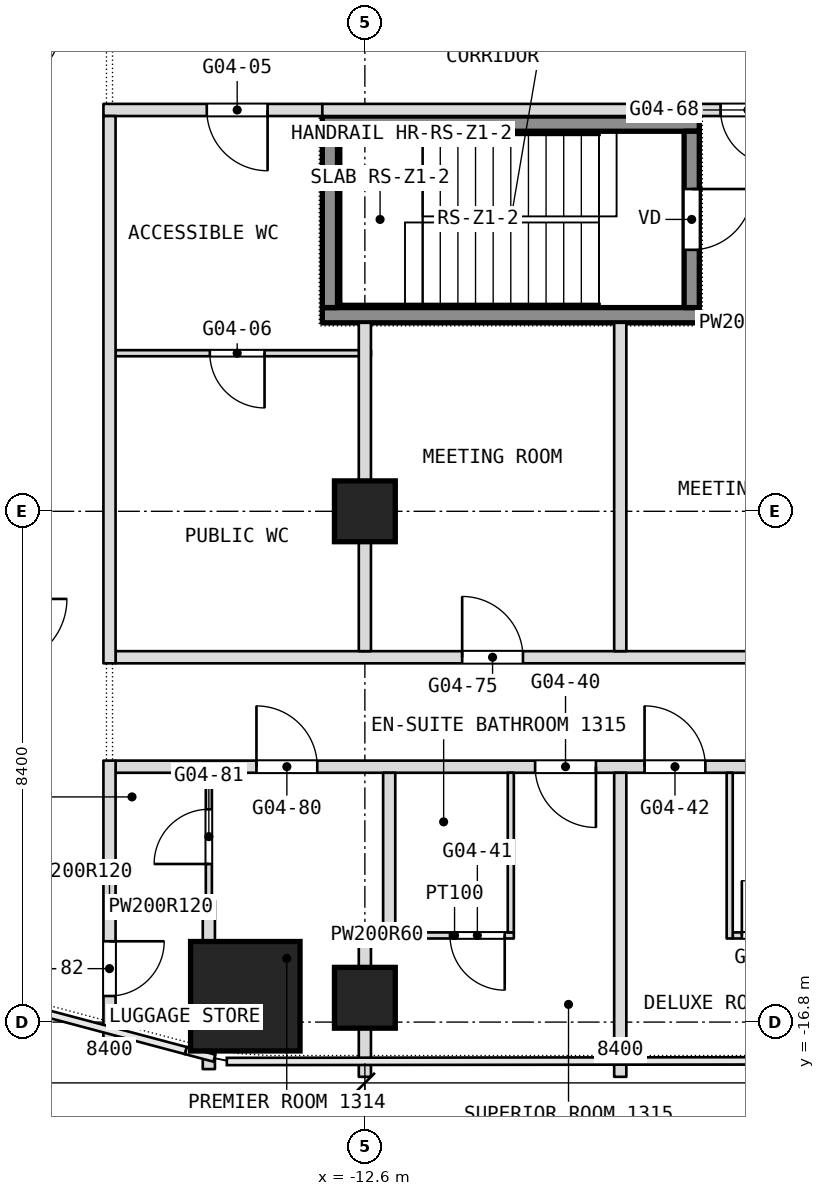
"""IFC4 building model, lengths in metres.
Left out: names, types, materials, properties, quantities, classifications, styles, units other than length and angle.
Written with IfcOpenShell. Run it as: python <this file> out.ifc"""

import sys

from ifc_helpers import new_model, si_unit, direction, frame, frame_2d, origin, origin_2d, place, context, subcontext, project, spatial, rectangle, extrude, element, fill, save


model = new_model("IFC4")
c1 = context("Model", 3, precision=1e-05, world=origin(), true_north=direction((0.0, 1.0)))
c2 = subcontext(c1, "Body", "Model", "MODEL_VIEW")
j1 = project(units=[si_unit("LENGTHUNIT", "METRE"), si_unit("PLANEANGLEUNIT", "RADIAN")], contexts=[c1])
p1 = place(None, origin())
s1 = spatial("IfcSite", under=j1, at=p1, CompositionType="ELEMENT")
p2 = place(p1, origin())
s2 = spatial("IfcBuilding", under=s1, at=p2, CompositionType="ELEMENT")
p3 = place(p2, frame((0.0, 0.0, 61.7)))
s3 = spatial("IfcBuildingStorey", under=s2, at=p3, CompositionType="ELEMENT", Elevation=61.7)
p4 = place(p3, frame((-14.566, -16.375, 0.0), z_axis=(0.0, 0.0, 1.0), x_axis=(1.0, 0.0, 0.0)))
e1 = element("IfcColumn", 1, at=p4, inside=s3, PredefinedType="COLUMN", context=c2, shape_type="SweptSolid", body=[
    extrude(rectangle(XDim=1.8, YDim=1.8, at=origin_2d()), origin(), (0.0, 0.0, 1.0), 3.6),
])
for number, where, z_axis, x_axis in (
    (2, (-12.6, -8.4, 0.0), (0.0, 0.0, 1.0), (1.0, 0.0, 0.0)),
    (3, (-12.6, -16.4, 0.0), (0.0, 0.0, 1.0), (1.0, 0.0, 0.0)),
):
    element("IfcColumn", number, at=place(p3, frame(where, z_axis=z_axis, x_axis=x_axis)), inside=s3, PredefinedType="COLUMN", context=c2, shape_type="SweptSolid", body=[
        extrude(rectangle(XDim=1.0, YDim=1.0, at=origin_2d()), origin(), (0.0, 0.0, 1.0), 3.6),
    ])
p5 = place(p3, frame((-12.7, -15.375, 0.0), z_axis=(0.0, 0.0, 1.0), x_axis=(1.0, 0.0, 0.0)))
e4 = element("IfcWall", 4, at=p5, inside=s3, PredefinedType="PARTITIONING", context=c2, shape_type="SweptSolid", body=[
    extrude(rectangle(XDim=0.6, YDim=0.2, at=frame_2d((0.3, 0.0))), origin(), (0.0, 0.0, 1.0), 3.34),
])
p6 = place(p3, frame((-12.1, -15.375, 0.0), z_axis=(0.0, 0.0, 1.0), x_axis=(1.0, 0.0, 0.0)))
e5 = element("IfcWall", 5, at=p6, inside=s3, PredefinedType="PARTITIONING", context=c2, shape_type="SweptSolid", body=[
    extrude(rectangle(XDim=1.95, YDim=0.1, at=frame_2d((0.975, 0.0))), origin(), (0.0, 0.0, 1.0), 3.34),
])
p7 = place(p6, frame((0.9, 0.0, 0.0)))
e6 = element("IfcOpeningElement", 6, at=p7, cuts=e5, PredefinedType="OPENING", context=c2, shape_type="SweptSolid", body=[
    extrude(rectangle(XDim=0.9, YDim=2.1, at=frame_2d((0.45, 1.05))), frame((0.0, 0.05, 0.0), z_axis=(0.0, -1.0, 0.0), x_axis=(1.0, 0.0, 0.0)), (0.0, 0.0, 1.0), 0.1),
])
p8 = place(p3, frame((-6.55, -15.375, 0.0), z_axis=(0.0, 0.0, 1.0), x_axis=(1.0, 0.0, 0.0)))
e7 = element("IfcWall", 7, at=p8, inside=s3, PredefinedType="PARTITIONING", context=c2, shape_type="SweptSolid", body=[
    extrude(rectangle(XDim=2.45, YDim=0.1, at=frame_2d((1.225, 0.0))), origin(), (0.0, 0.0, 1.0), 3.34),
])
p9 = place(p8, frame((0.15, 0.0, 0.0)))
e8 = element("IfcOpeningElement", 8, at=p9, cuts=e7, PredefinedType="OPENING", context=c2, shape_type="SweptSolid", body=[
    extrude(rectangle(XDim=0.9, YDim=2.1, at=frame_2d((0.45, 1.05))), frame((0.0, 0.05, 0.0), z_axis=(0.0, -1.0, 0.0), x_axis=(1.0, 0.0, 0.0)), (0.0, 0.0, 1.0), 0.1),
])
p10 = place(p3, frame((-16.7, -14.9, 0.0), z_axis=(0.0, 0.0, 1.0), x_axis=(1.0, 0.0, 0.0)))
e9 = element("IfcWall", 9, at=p10, inside=s3, PredefinedType="PARTITIONING", context=c2, shape_type="SweptSolid", body=[
    extrude(rectangle(XDim=1.484, YDim=0.2, at=frame_2d((0.742, 0.0))), origin(), (0.0, 0.0, 1.0), 3.34),
])
p11 = place(p3, frame((-16.7, -12.6, 0.0), z_axis=(0.0, 0.0, 1.0), x_axis=(1.0, 0.0, 0.0)))
e10 = element("IfcWall", 10, at=p11, inside=s3, PredefinedType="PARTITIONING", context=c2, shape_type="SweptSolid", body=[
    extrude(rectangle(XDim=33.4, YDim=0.2, at=frame_2d((16.7, 0.0))), origin(), (0.0, 0.0, 1.0), 3.34),
])
p12 = place(p11, frame((6.9, 0.0, 0.0)))
e11 = element("IfcOpeningElement", 11, at=p12, cuts=e10, PredefinedType="OPENING", context=c2, shape_type="SweptSolid", body=[
    extrude(rectangle(XDim=1.0, YDim=2.1, at=frame_2d((0.5, 1.05))), frame((0.0, 0.1, 0.0), z_axis=(0.0, -1.0, 0.0), x_axis=(1.0, 0.0, 0.0)), (0.0, 0.0, 1.0), 0.2),
])
p13 = place(p11, frame((8.7, 0.0, 0.0)))
e12 = element("IfcOpeningElement", 12, at=p13, cuts=e10, PredefinedType="OPENING", context=c2, shape_type="SweptSolid", body=[
    extrude(rectangle(XDim=1.0, YDim=2.1, at=frame_2d((0.5, 1.05))), frame((0.0, 0.1, 0.0), z_axis=(0.0, -1.0, 0.0), x_axis=(1.0, 0.0, 0.0)), (0.0, 0.0, 1.0), 0.2),
])
p14 = place(p11, frame((16.1, 0.0, 0.0)))
e13 = element("IfcOpeningElement", 13, at=p14, cuts=e10, PredefinedType="OPENING", context=c2, shape_type="SweptSolid", body=[
    extrude(rectangle(XDim=1.1, YDim=2.1, at=frame_2d((0.55, 1.05))), frame((0.0, 0.1, 0.0), z_axis=(0.0, -1.0, 0.0), x_axis=(1.0, 0.0, 0.0)), (0.0, 0.0, 1.0), 0.2),
])
p15 = place(p11, frame((24.6, 0.0, 0.0)))
e14 = element("IfcOpeningElement", 14, at=p15, cuts=e10, PredefinedType="OPENING", context=c2, shape_type="SweptSolid", body=[
    extrude(rectangle(XDim=1.1, YDim=2.1, at=frame_2d((0.55, 1.05))), frame((0.0, 0.1, 0.0), z_axis=(0.0, -1.0, 0.0), x_axis=(1.0, 0.0, 0.0)), (0.0, 0.0, 1.0), 0.2),
])
p16 = place(p11, frame((2.317, 0.0, 0.0)))
e15 = element("IfcOpeningElement", 15, at=p16, cuts=e10, PredefinedType="OPENING", context=c2, shape_type="SweptSolid", body=[
    extrude(rectangle(XDim=1.0, YDim=2.1, at=frame_2d((0.5, 1.05))), frame((0.0, 0.1, 0.0), z_axis=(0.0, -1.0, 0.0), x_axis=(1.0, 0.0, 0.0)), (0.0, 0.0, 1.0), 0.2),
])
p17 = place(p11, frame((30.033, 0.0, 0.0)))
e16 = element("IfcOpeningElement", 16, at=p17, cuts=e10, PredefinedType="OPENING", context=c2, shape_type="SweptSolid", body=[
    extrude(rectangle(XDim=1.0, YDim=2.1, at=frame_2d((0.5, 1.05))), frame((0.0, 0.1, 0.0), z_axis=(0.0, -1.0, 0.0), x_axis=(1.0, 0.0, 0.0)), (0.0, 0.0, 1.0), 0.2),
])
p18 = place(p3, frame((-16.7, -10.8, 0.0), z_axis=(0.0, 0.0, 1.0), x_axis=(1.0, 0.0, 0.0)))
e17 = element("IfcWall", 17, at=p18, inside=s3, PredefinedType="PARTITIONING", context=c2, shape_type="SweptSolid", body=[
    extrude(rectangle(XDim=33.4, YDim=0.2, at=frame_2d((16.7, 0.0))), origin(), (0.0, 0.0, 1.0), 3.34),
])
p19 = place(p18, frame((5.7, 0.0, 0.0)))
e18 = element("IfcOpeningElement", 18, at=p19, cuts=e17, PredefinedType="OPENING", context=c2, shape_type="SweptSolid", body=[
    extrude(rectangle(XDim=1.0, YDim=2.1, at=frame_2d((0.5, 1.05))), frame((0.0, 0.1, 0.0), z_axis=(0.0, -1.0, 0.0), x_axis=(1.0, 0.0, 0.0)), (0.0, 0.0, 1.0), 0.2),
])
p20 = place(p18, frame((18.3, 0.0, 0.0)))
e19 = element("IfcOpeningElement", 19, at=p20, cuts=e17, PredefinedType="OPENING", context=c2, shape_type="SweptSolid", body=[
    extrude(rectangle(XDim=1.0, YDim=2.1, at=frame_2d((0.5, 1.05))), frame((0.0, 0.1, 0.0), z_axis=(0.0, -1.0, 0.0), x_axis=(1.0, 0.0, 0.0)), (0.0, 0.0, 1.0), 0.2),
])
p21 = place(p3, frame((-16.7, -5.8, 0.0), z_axis=(0.0, 0.0, 1.0), x_axis=(1.0, 0.0, 0.0)))
e20 = element("IfcWall", 20, at=p21, inside=s3, PredefinedType="PARTITIONING", context=c2, shape_type="SweptSolid", body=[
    extrude(rectangle(XDim=4.2, YDim=0.1, at=frame_2d((2.1, 0.0))), origin(), (0.0, 0.0, 1.0), 3.34),
])
p22 = place(p21, frame((1.55, 0.0, 0.0)))
e21 = element("IfcOpeningElement", 21, at=p22, cuts=e20, PredefinedType="OPENING", context=c2, shape_type="SweptSolid", body=[
    extrude(rectangle(XDim=0.9, YDim=2.1, at=frame_2d((0.45, 1.05))), frame((0.0, 0.05, 0.0), z_axis=(0.0, -1.0, 0.0), x_axis=(1.0, 0.0, 0.0)), (0.0, 0.0, 1.0), 0.1),
])
p23 = place(p3, frame((-7.1, -5.3, 0.0), z_axis=(0.0, 0.0, 1.0), x_axis=(1.0, 0.0, 0.0)))
e22 = element("IfcWall", 22, at=p23, inside=s3, PredefinedType="PARTITIONING", context=c2, shape_type="SweptSolid", body=[
    extrude(rectangle(XDim=1.7, YDim=0.2, at=frame_2d((0.85, 0.0))), origin(), (0.0, 0.0, 1.0), 3.34),
])
p24 = place(p3, frame((-16.9, -1.8, 0.0), z_axis=(0.0, 0.0, 1.0), x_axis=(1.0, 0.0, 0.0)))
e23 = element("IfcWall", 23, at=p24, inside=s3, PredefinedType="PARTITIONING", context=c2, shape_type="SweptSolid", body=[
    extrude(rectangle(XDim=3.6, YDim=0.2, at=frame_2d((1.8, 0.0))), origin(), (0.0, 0.0, 1.0), 3.34),
])
p25 = place(p24, frame((1.7, 0.0, 0.0)))
e24 = element("IfcOpeningElement", 24, at=p25, cuts=e23, PredefinedType="OPENING", context=c2, shape_type="SweptSolid", body=[
    extrude(rectangle(XDim=1.0, YDim=2.1, at=frame_2d((0.5, 1.05))), frame((0.0, 0.1, 0.0), z_axis=(0.0, -1.0, 0.0), x_axis=(1.0, 0.0, 0.0)), (0.0, 0.0, 1.0), 0.2),
])
p26 = place(p3, frame((-13.3, -1.8, 0.0), z_axis=(0.0, 0.0, 1.0), x_axis=(1.0, 0.0, 0.0)))
e25 = element("IfcWall", 25, at=p26, inside=s3, PredefinedType="PARTITIONING", context=c2, shape_type="SweptSolid", body=[
    extrude(rectangle(XDim=7.9, YDim=0.2, at=frame_2d((3.95, 0.0))), origin(), (0.0, 0.0, 1.0), 3.34),
])
p27 = place(p26, frame((6.55, 0.0, 0.0)))
e26 = element("IfcOpeningElement", 26, at=p27, cuts=e25, PredefinedType="OPENING", context=c2, shape_type="SweptSolid", body=[
    extrude(rectangle(XDim=0.9, YDim=2.1, at=frame_2d((0.45, 1.05))), frame((0.0, 0.1, 0.0), z_axis=(0.0, -1.0, 0.0), x_axis=(1.0, 0.0, 0.0)), (0.0, 0.0, 1.0), 0.2),
])
p28 = place(p3, frame((-6.6, -15.425, 0.0), z_axis=(0.0, 0.0, 1.0), x_axis=(0.0, 1.0, 0.0)))
e27 = element("IfcWall", 27, at=p28, inside=s3, PredefinedType="PARTITIONING", context=c2, shape_type="SweptSolid", body=[
    extrude(rectangle(XDim=2.725, YDim=0.1, at=frame_2d((1.363, 0.0))), origin(), (0.0, 0.0, 1.0), 3.34),
])
p29 = place(p3, frame((-8.4, -17.7, 0.0), z_axis=(0.0, 0.0, 1.0), x_axis=(0.0, 1.0, 0.0)))
e28 = element("IfcWall", 28, at=p29, inside=s3, PredefinedType="PARTITIONING", context=c2, shape_type="SweptSolid", body=[
    extrude(rectangle(XDim=5.0, YDim=0.2, at=frame_2d((2.5, 0.0))), origin(), (0.0, 0.0, 1.0), 3.34),
])
p30 = place(p3, frame((-8.4, -10.7, 0.0), z_axis=(0.0, 0.0, 1.0), x_axis=(0.0, 1.0, 0.0)))
e29 = element("IfcWall", 29, at=p30, inside=s3, PredefinedType="PARTITIONING", context=c2, shape_type="SweptSolid", body=[
    extrude(rectangle(XDim=5.4, YDim=0.2, at=frame_2d((2.7, 0.0))), origin(), (0.0, 0.0, 1.0), 3.34),
])
p31 = place(p3, frame((-10.2, -15.325, 0.0), z_axis=(0.0, 0.0, 1.0), x_axis=(0.0, 1.0, 0.0)))
e30 = element("IfcWall", 30, at=p31, inside=s3, PredefinedType="PARTITIONING", context=c2, shape_type="SweptSolid", body=[
    extrude(rectangle(XDim=2.625, YDim=0.1, at=frame_2d((1.312, 0.0))), origin(), (0.0, 0.0, 1.0), 3.34),
])
p32 = place(p3, frame((-12.2, -15.275, 0.0), z_axis=(0.0, 0.0, 1.0), x_axis=(0.0, 1.0, 0.0)))
e31 = element("IfcWall", 31, at=p32, inside=s3, PredefinedType="PARTITIONING", context=c2, shape_type="SweptSolid", body=[
    extrude(rectangle(XDim=2.575, YDim=0.2, at=frame_2d((1.288, 0.0))), origin(), (0.0, 0.0, 1.0), 3.34),
])
p33 = place(p3, frame((-12.6, -17.7, 0.0), z_axis=(0.0, 0.0, 1.0), x_axis=(0.0, 1.0, 0.0)))
e32 = element("IfcWall", 32, at=p33, inside=s3, PredefinedType="PARTITIONING", context=c2, shape_type="SweptSolid", body=[
    extrude(rectangle(XDim=2.225, YDim=0.2, at=frame_2d((1.112, 0.0))), origin(), (0.0, 0.0, 1.0), 3.34),
])
p34 = place(p3, frame((-12.6, -10.7, 0.0), z_axis=(0.0, 0.0, 1.0), x_axis=(0.0, 1.0, 0.0)))
e33 = element("IfcWall", 33, at=p34, inside=s3, PredefinedType="PARTITIONING", context=c2, shape_type="SweptSolid", body=[
    extrude(rectangle(XDim=5.4, YDim=0.2, at=frame_2d((2.7, 0.0))), origin(), (0.0, 0.0, 1.0), 3.34),
])
p35 = place(p3, frame((-15.166, -17.573, 0.0), z_axis=(0.0, 0.0, 1.0), x_axis=(0.0, 1.0, 0.0)))
e34 = element("IfcWall", 34, at=p35, inside=s3, PredefinedType="PARTITIONING", context=c2, shape_type="SweptSolid", body=[
    extrude(rectangle(XDim=0.298, YDim=0.2, at=frame_2d((0.149, 0.0))), origin(), (0.0, 0.0, 1.0), 3.34),
])
p36 = place(p3, frame((-15.166, -15.475, 0.0), z_axis=(0.0, 0.0, 1.0), x_axis=(0.0, 1.0, 0.0)))
e35 = element("IfcWall", 35, at=p36, inside=s3, PredefinedType="PARTITIONING", context=c2, shape_type="SweptSolid", body=[
    extrude(rectangle(XDim=0.675, YDim=0.2, at=frame_2d((0.337, 0.0))), origin(), (0.0, 0.0, 1.0), 3.34),
])
p37 = place(p3, frame((-15.166, -15.0, 0.0), z_axis=(0.0, 0.0, 1.0), x_axis=(0.0, 1.0, 0.0)))
e36 = element("IfcWall", 36, at=p37, inside=s3, PredefinedType="PARTITIONING", context=c2, shape_type="SweptSolid", body=[
    extrude(rectangle(XDim=2.3, YDim=0.1, at=frame_2d((1.15, 0.0))), origin(), (0.0, 0.0, 1.0), 3.34),
])
p38 = place(p37, frame((0.8, 0.0, 0.0)))
e37 = element("IfcOpeningElement", 37, at=p38, cuts=e36, PredefinedType="OPENING", context=c2, shape_type="SweptSolid", body=[
    extrude(rectangle(XDim=0.9, YDim=2.1, at=frame_2d((0.45, 1.05))), frame((0.0, 0.05, 0.0), z_axis=(0.0, -1.0, 0.0), x_axis=(1.0, 0.0, 0.0)), (0.0, 0.0, 1.0), 0.1),
])
p39 = place(p3, frame((-16.8, -17.143, 0.0), z_axis=(0.0, 0.0, 1.0), x_axis=(0.0, 1.0, 0.0)))
e38 = element("IfcWall", 38, at=p39, inside=s3, PredefinedType="PARTITIONING", context=c2, shape_type="SweptSolid", body=[
    extrude(rectangle(XDim=4.643, YDim=0.2, at=frame_2d((2.322, 0.0))), origin(), (0.0, 0.0, 1.0), 3.34),
])
p40 = place(p39, frame((0.772, 0.0, 0.0)))
e39 = element("IfcOpeningElement", 39, at=p40, cuts=e38, PredefinedType="OPENING", context=c2, shape_type="SweptSolid", body=[
    extrude(rectangle(XDim=0.9, YDim=2.1, at=frame_2d((0.45, 1.05))), frame((0.0, 0.1, 0.0), z_axis=(0.0, -1.0, 0.0), x_axis=(1.0, 0.0, 0.0)), (0.0, 0.0, 1.0), 0.2),
])
p41 = place(p3, frame((-16.8, -10.9, 0.0), z_axis=(0.0, 0.0, 1.0), x_axis=(0.0, 1.0, 0.0)))
e40 = element("IfcWall", 40, at=p41, inside=s3, PredefinedType="PARTITIONING", context=c2, shape_type="SweptSolid", body=[
    extrude(rectangle(XDim=9.0, YDim=0.2, at=frame_2d((4.5, 0.0))), origin(), (0.0, 0.0, 1.0), 3.34),
])
for number, where, z_axis, x_axis in (
    (41, (-13.3, -5.175, 0.1), (0.0, 0.0, 1.0), (1.0, 0.0, 0.0)),
    (42, (-13.3, -2.025, 0.1), (0.0, 0.0, 1.0), (1.0, 0.0, 0.0)),
):
    element("IfcWall", number, at=place(p3, frame(where, z_axis=z_axis, x_axis=x_axis)), inside=s3, PredefinedType="SHEAR", context=c2, shape_type="SweptSolid", body=[
        extrude(rectangle(XDim=6.2, YDim=0.25, at=frame_2d((3.1, 0.0))), origin(), (0.0, 0.0, 1.0), 3.6),
    ])
p42 = place(p3, frame((-13.175, -5.05, 0.1), z_axis=(0.0, 0.0, 1.0), x_axis=(0.0, 1.0, 0.0)))
e43 = element("IfcWall", 43, at=p42, inside=s3, PredefinedType="SHEAR", context=c2, shape_type="SweptSolid", body=[
    extrude(rectangle(XDim=2.9, YDim=0.25, at=frame_2d((1.45, 0.0))), origin(), (0.0, 0.0, 1.0), 3.6),
])
p43 = place(p3, frame((-7.225, -5.05, 0.1), z_axis=(0.0, 0.0, 1.0), x_axis=(0.0, 1.0, 0.0)))
e44 = element("IfcWall", 44, at=p43, inside=s3, PredefinedType="SHEAR", context=c2, shape_type="SweptSolid", body=[
    extrude(rectangle(XDim=2.9, YDim=0.25, at=frame_2d((1.45, 0.0))), origin(), (0.0, 0.0, 1.0), 3.6),
])
p44 = place(p43, frame((0.95, 0.0, 0.0)))
e45 = element("IfcOpeningElement", 45, at=p44, cuts=e44, PredefinedType="OPENING", context=c2, shape_type="SweptSolid", body=[
    extrude(rectangle(XDim=1.0, YDim=2.1, at=frame_2d((0.5, 1.05))), frame((0.0, 0.125, 0.0), z_axis=(0.0, -1.0, 0.0), x_axis=(1.0, 0.0, 0.0)), (0.0, 0.0, 1.0), 0.25),
])
p45 = place(p7, origin())
e46 = element("IfcDoor", 46, at=p45, inside=s3, OperationType="SINGLE_SWING_RIGHT", PredefinedType="DOOR", context=c2, shape_type="SweptSolid", body=[
    extrude(rectangle(XDim=0.9, YDim=2.1, at=frame_2d((0.45, 1.05))), frame((0.0, 0.025, 0.0), z_axis=(0.0, -1.0, 0.0), x_axis=(1.0, 0.0, 0.0)), (0.0, 0.0, 1.0), 0.05),
])
fill(e6, e46)
p46 = place(p9, origin())
e47 = element("IfcDoor", 47, at=p46, inside=s3, OperationType="SINGLE_SWING_LEFT", PredefinedType="DOOR", context=c2, shape_type="SweptSolid", body=[
    extrude(rectangle(XDim=0.9, YDim=2.1, at=frame_2d((0.45, 1.05))), frame((0.0, 0.025, 0.0), z_axis=(0.0, -1.0, 0.0), x_axis=(1.0, 0.0, 0.0)), (0.0, 0.0, 1.0), 0.05),
])
fill(e8, e47)
p47 = place(p12, origin())
e48 = element("IfcDoor", 48, at=p47, inside=s3, OperationType="SINGLE_SWING_RIGHT", PredefinedType="DOOR", context=c2, shape_type="SweptSolid", body=[
    extrude(rectangle(XDim=1.0, YDim=2.1, at=frame_2d((0.5, 1.05))), frame((0.0, 0.025, 0.0), z_axis=(0.0, -1.0, 0.0), x_axis=(1.0, 0.0, 0.0)), (0.0, 0.0, 1.0), 0.05),
])
fill(e11, e48)
p48 = place(p13, origin())
e49 = element("IfcDoor", 49, at=p48, inside=s3, OperationType="SINGLE_SWING_RIGHT", PredefinedType="DOOR", context=c2, shape_type="SweptSolid", body=[
    extrude(rectangle(XDim=1.0, YDim=2.1, at=frame_2d((0.5, 1.05))), frame((0.0, 0.025, 0.0), z_axis=(0.0, -1.0, 0.0), x_axis=(1.0, 0.0, 0.0)), (0.0, 0.0, 1.0), 0.05),
])
fill(e12, e49)
p49 = place(p16, origin())
e50 = element("IfcDoor", 50, at=p49, inside=s3, OperationType="SINGLE_SWING_RIGHT", PredefinedType="DOOR", context=c2, shape_type="SweptSolid", body=[
    extrude(rectangle(XDim=1.0, YDim=2.1, at=frame_2d((0.5, 1.05))), frame((0.0, 0.025, 0.0), z_axis=(0.0, -1.0, 0.0), x_axis=(1.0, 0.0, 0.0)), (0.0, 0.0, 1.0), 0.05),
])
fill(e15, e50)
p50 = place(p19, origin())
e51 = element("IfcDoor", 51, at=p50, inside=s3, OperationType="SINGLE_SWING_LEFT", PredefinedType="DOOR", context=c2, shape_type="SweptSolid", body=[
    extrude(rectangle(XDim=1.0, YDim=2.1, at=frame_2d((0.5, 1.05))), frame((0.0, 0.025, 0.0), z_axis=(0.0, -1.0, 0.0), x_axis=(1.0, 0.0, 0.0)), (0.0, 0.0, 1.0), 0.05),
])
fill(e18, e51)
p51 = place(p22, origin())
e52 = element("IfcDoor", 52, at=p51, inside=s3, OperationType="SINGLE_SWING_RIGHT", PredefinedType="DOOR", context=c2, shape_type="SweptSolid", body=[
    extrude(rectangle(XDim=0.9, YDim=2.1, at=frame_2d((0.45, 1.05))), frame((0.0, 0.025, 0.0), z_axis=(0.0, -1.0, 0.0), x_axis=(1.0, 0.0, 0.0)), (0.0, 0.0, 1.0), 0.05),
])
fill(e21, e52)
p52 = place(p25, origin())
e53 = element("IfcDoor", 53, at=p52, inside=s3, OperationType="SINGLE_SWING_RIGHT", PredefinedType="DOOR", context=c2, shape_type="SweptSolid", body=[
    extrude(rectangle(XDim=1.0, YDim=2.1, at=frame_2d((0.5, 1.05))), frame((0.0, 0.025, 0.0), z_axis=(0.0, -1.0, 0.0), x_axis=(1.0, 0.0, 0.0)), (0.0, 0.0, 1.0), 0.05),
])
fill(e24, e53)
p53 = place(p27, origin())
e54 = element("IfcDoor", 54, at=p53, inside=s3, OperationType="SINGLE_SWING_LEFT", PredefinedType="DOOR", context=c2, shape_type="SweptSolid", body=[
    extrude(rectangle(XDim=0.9, YDim=2.1, at=frame_2d((0.45, 1.05))), frame((0.0, 0.025, 0.0), z_axis=(0.0, -1.0, 0.0), x_axis=(1.0, 0.0, 0.0)), (0.0, 0.0, 1.0), 0.05),
])
fill(e26, e54)
p54 = place(p38, origin())
e55 = element("IfcDoor", 55, at=p54, inside=s3, OperationType="SINGLE_SWING_RIGHT", PredefinedType="DOOR", context=c2, shape_type="SweptSolid", body=[
    extrude(rectangle(XDim=0.9, YDim=2.1, at=frame_2d((0.45, 1.05))), frame((0.0, 0.025, 0.0), z_axis=(0.0, -1.0, 0.0), x_axis=(1.0, 0.0, 0.0)), (0.0, 0.0, 1.0), 0.05),
])
fill(e37, e55)
p55 = place(p40, origin())
e56 = element("IfcDoor", 56, at=p55, inside=s3, OperationType="SINGLE_SWING_LEFT", PredefinedType="DOOR", context=c2, shape_type="SweptSolid", body=[
    extrude(rectangle(XDim=0.9, YDim=2.1, at=frame_2d((0.45, 1.05))), frame((0.0, 0.025, 0.0), z_axis=(0.0, -1.0, 0.0), x_axis=(1.0, 0.0, 0.0)), (0.0, 0.0, 1.0), 0.05),
])
fill(e39, e56)
p56 = place(p44, origin())
e57 = element("IfcDoor", 57, at=p56, inside=s3, OperationType="SINGLE_SWING_LEFT", PredefinedType="DOOR", context=c2, shape_type="SweptSolid", body=[
    extrude(rectangle(XDim=1.0, YDim=2.1, at=frame_2d((0.5, 1.05))), frame((0.0, 0.025, 0.0), z_axis=(0.0, -1.0, 0.0), x_axis=(1.0, 0.0, 0.0)), (0.0, 0.0, 1.0), 0.05),
])
fill(e45, e57)
save(model, sys.argv[1])
